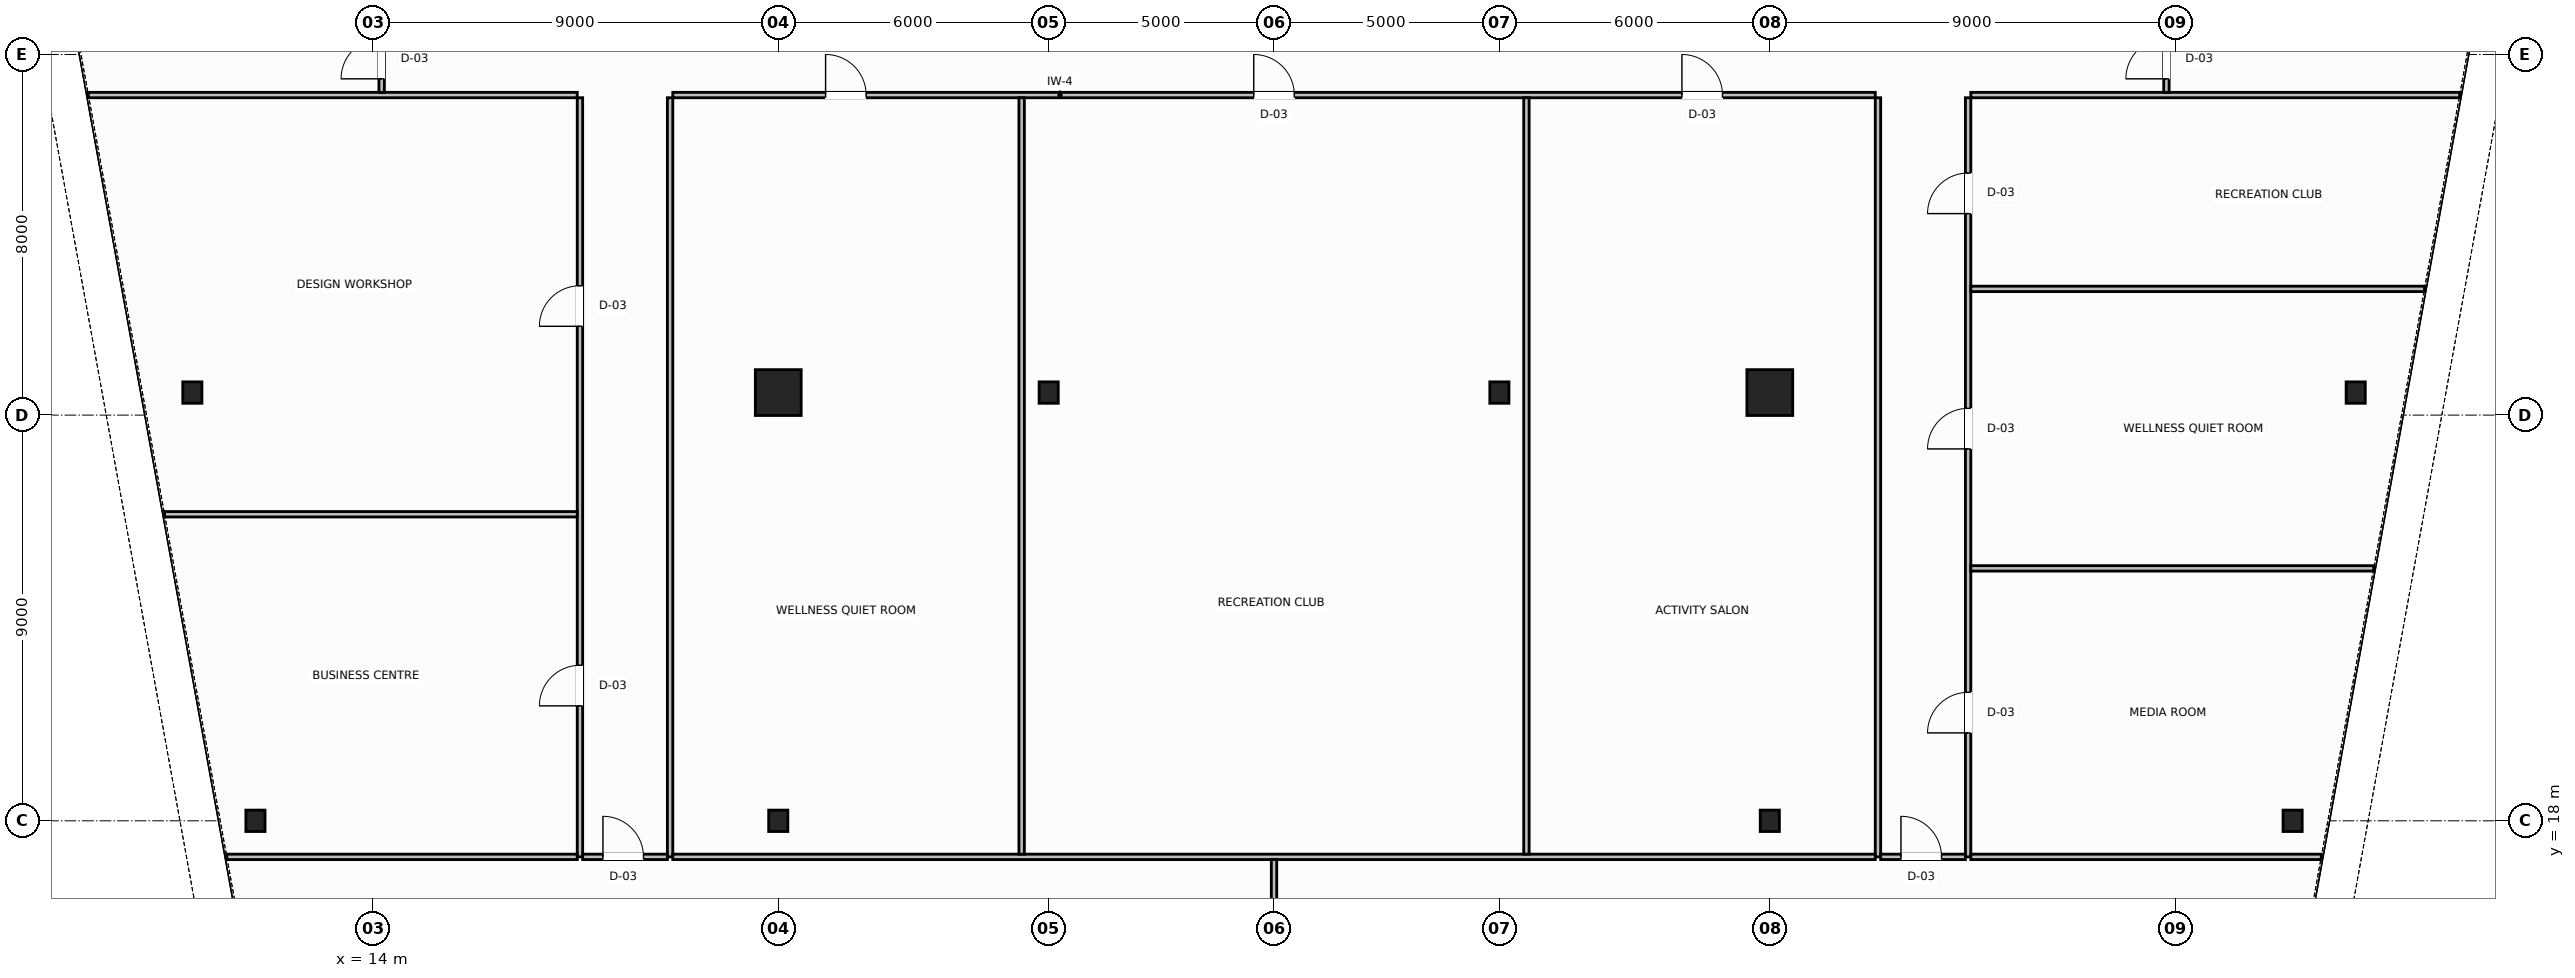
"""IFC4 building model, lengths in metres.
Left out: names, types, materials, properties, quantities, classifications, styles, units other than length and angle.
Written with IfcOpenShell. Run it as: python <this file> out.ifc"""

import sys

from ifc_helpers import new_model, si_unit, direction, frame, frame_2d, origin, origin_2d, place, context, subcontext, project, spatial, rectangle, hollow_circle, i_section, extrude, source, transform, mapped, element, fill, save


model = new_model("IFC4")
c1 = context("Model", 3, precision=1e-05, world=origin(), true_north=direction((0.0, 1.0)))
c2 = subcontext(c1, "Body", "Model", "MODEL_VIEW")
j1 = project(units=[si_unit("LENGTHUNIT", "METRE"), si_unit("PLANEANGLEUNIT", "RADIAN")], contexts=[c1])
p1 = place(None, origin())
s1 = spatial("IfcSite", under=j1, at=p1, CompositionType="ELEMENT")
p2 = place(p1, origin())
s2 = spatial("IfcBuilding", under=s1, at=p2, CompositionType="ELEMENT")
p3 = place(p2, frame((0.0, 0.0, 130.0)))
s3 = spatial("IfcBuildingStorey", under=s2, at=p3, CompositionType="ELEMENT", Elevation=130.0)
m1 = source(origin(), c2, "Body", "SweptSolid", [
    extrude(i_section(OverallWidth=0.424, OverallDepth=0.474, WebThickness=0.047, FlangeThickness=0.065, FilletRadius=0.015, at=origin_2d()), origin(), (0.0, 0.0, 1.0), 3.8),
])
for number, where, z_axis, x_axis in (
    (1, (10.0, 27.5, 0.0), (0.0, 0.0, 1.0), (1.0, 0.0, 0.0)),
    (2, (11.4, 18.0, 0.0), (0.0, 0.0, 1.0), (1.0, 0.0, 0.0)),
    (3, (58.0, 27.5, 0.0), (0.0, 0.0, 1.0), (1.0, 0.0, 0.0)),
    (4, (56.6, 18.0, 0.0), (0.0, 0.0, 1.0), (1.0, 0.0, 0.0)),
):
    element("IfcColumn", number, at=place(p3, frame(where, z_axis=z_axis, x_axis=x_axis)), inside=s3, PredefinedType="COLUMN", context=c2, shape_type="MappedRepresentation", body=[
        mapped(m1, transform((0.0, 0.0, 0.0), scale=1.0)),
    ])
m2 = source(origin(), c2, "Body", "SweptSolid", [
    extrude(hollow_circle(Radius=0.508, WallThickness=0.045, at=origin_2d()), origin(), (0.0, 0.0, 1.0), 3.8),
])
p4 = place(p3, frame((23.0, 27.5, 0.0), z_axis=(0.0, 0.0, 1.0), x_axis=(1.0, 0.0, 0.0)))
e5 = element("IfcColumn", 5, at=p4, inside=s3, PredefinedType="COLUMN", context=c2, shape_type="MappedRepresentation", body=[
    mapped(m2, transform((0.0, 0.0, 0.0), scale=1.0)),
])
m3 = source(origin(), c2, "Body", "SweptSolid", [
    extrude(i_section(OverallWidth=0.424, OverallDepth=0.474, WebThickness=0.047, FlangeThickness=0.065, FilletRadius=0.015, at=origin_2d()), origin(), (0.0, 0.0, 1.0), 3.8),
])
for number, where, z_axis, x_axis in (
    (6, (29.0, 27.5, 0.0), (0.0, 0.0, 1.0), (1.0, 0.0, 0.0)),
    (7, (39.0, 27.5, 0.0), (0.0, 0.0, 1.0), (1.0, 0.0, 0.0)),
):
    element("IfcColumn", number, at=place(p3, frame(where, z_axis=z_axis, x_axis=x_axis)), inside=s3, PredefinedType="COLUMN", context=c2, shape_type="MappedRepresentation", body=[
        mapped(m3, transform((0.0, 0.0, 0.0), scale=1.0)),
    ])
p5 = place(p3, frame((45.0, 27.5, 0.0), z_axis=(0.0, 0.0, 1.0), x_axis=(1.0, 0.0, 0.0)))
e8 = element("IfcColumn", 8, at=p5, inside=s3, PredefinedType="COLUMN", context=c2, shape_type="MappedRepresentation", body=[
    mapped(m2, transform((0.0, 0.0, 0.0), scale=1.0)),
])
for number, where, z_axis, x_axis in (
    (9, (23.0, 18.0, 0.0), (0.0, 0.0, 1.0), (1.0, 0.0, 0.0)),
    (10, (45.0, 18.0, 0.0), (0.0, 0.0, 1.0), (1.0, 0.0, 0.0)),
):
    element("IfcColumn", number, at=place(p3, frame(where, z_axis=z_axis, x_axis=x_axis)), inside=s3, PredefinedType="COLUMN", context=c2, shape_type="MappedRepresentation", body=[
        mapped(m3, transform((0.0, 0.0, 0.0), scale=1.0)),
    ])
p6 = place(p3, frame((20.66, 34.1, 0.0), z_axis=(0.0, 0.0, 1.0), x_axis=(1.0, 0.0, 0.0)))
e11 = element("IfcWall", 11, at=p6, inside=s3, PredefinedType="PARTITIONING", context=c2, shape_type="SweptSolid", body=[
    extrude(rectangle(XDim=26.68, YDim=0.12, at=frame_2d((13.34, 0.0))), origin(), (0.0, 0.0, 1.0), 3.58),
])
p7 = place(p6, frame((3.39, 0.0, 0.0)))
e12 = element("IfcOpeningElement", 12, at=p7, cuts=e11, PredefinedType="OPENING", context=c2, shape_type="SweptSolid", body=[
    extrude(rectangle(XDim=0.9, YDim=2.15, at=frame_2d((0.45, 1.075))), frame((0.0, 0.07, 0.0), z_axis=(0.0, -1.0, 0.0), x_axis=(1.0, 0.0, 0.0)), (0.0, 0.0, 1.0), 0.14),
])
p8 = place(p6, frame((12.89, 0.0, 0.0)))
e13 = element("IfcOpeningElement", 13, at=p8, cuts=e11, PredefinedType="OPENING", context=c2, shape_type="SweptSolid", body=[
    extrude(rectangle(XDim=0.9, YDim=2.15, at=frame_2d((0.45, 1.075))), frame((0.0, 0.07, 0.0), z_axis=(0.0, -1.0, 0.0), x_axis=(1.0, 0.0, 0.0)), (0.0, 0.0, 1.0), 0.14),
])
p9 = place(p6, frame((22.39, 0.0, 0.0)))
e14 = element("IfcOpeningElement", 14, at=p9, cuts=e11, PredefinedType="OPENING", context=c2, shape_type="SweptSolid", body=[
    extrude(rectangle(XDim=0.9, YDim=2.15, at=frame_2d((0.45, 1.075))), frame((0.0, 0.07, 0.0), z_axis=(0.0, -1.0, 0.0), x_axis=(1.0, 0.0, 0.0)), (0.0, 0.0, 1.0), 0.14),
])
for number, where, z_axis, x_axis in (
    (15, (7.693, 34.1, 0.0), (0.0, 0.0, 1.0), (1.0, 0.0, 0.0)),
    (16, (49.46, 34.1, 0.0), (0.0, 0.0, 1.0), (1.0, 0.0, 0.0)),
):
    element("IfcWall", number, at=place(p3, frame(where, z_axis=z_axis, x_axis=x_axis)), inside=s3, PredefinedType="PARTITIONING", context=c2, shape_type="SweptSolid", body=[
        extrude(rectangle(XDim=10.847, YDim=0.12, at=frame_2d((5.424, 0.0))), origin(), (0.0, 0.0, 1.0), 3.58),
    ])
p10 = place(p3, frame((14.2, 34.16, 0.0), z_axis=(0.0, 0.0, 1.0), x_axis=(0.0, 1.0, 0.0)))
e17 = element("IfcWall", 17, at=p10, inside=s3, PredefinedType="PARTITIONING", context=c2, shape_type="SweptSolid", body=[
    extrude(rectangle(XDim=2.28, YDim=0.12, at=frame_2d((1.14, 0.0))), origin(), (0.0, 0.0, 1.0), 3.58),
])
p11 = place(p10, frame((0.3, 0.0, 0.0)))
e18 = element("IfcOpeningElement", 18, at=p11, cuts=e17, PredefinedType="OPENING", context=c2, shape_type="SweptSolid", body=[
    extrude(rectangle(XDim=0.9, YDim=2.15, at=frame_2d((0.45, 1.075))), frame((0.0, 0.07, 0.0), z_axis=(0.0, -1.0, 0.0), x_axis=(1.0, 0.0, 0.0)), (0.0, 0.0, 1.0), 0.14),
])
p12 = place(p3, frame((53.8, 34.16, 0.0), z_axis=(0.0, 0.0, 1.0), x_axis=(0.0, 1.0, 0.0)))
e19 = element("IfcWall", 19, at=p12, inside=s3, PredefinedType="PARTITIONING", context=c2, shape_type="SweptSolid", body=[
    extrude(rectangle(XDim=2.28, YDim=0.12, at=frame_2d((1.14, 0.0))), origin(), (0.0, 0.0, 1.0), 3.58),
])
p13 = place(p12, frame((0.3, 0.0, 0.0)))
e20 = element("IfcOpeningElement", 20, at=p13, cuts=e19, PredefinedType="OPENING", context=c2, shape_type="SweptSolid", body=[
    extrude(rectangle(XDim=0.9, YDim=2.15, at=frame_2d((0.45, 1.075))), frame((0.0, 0.07, 0.0), z_axis=(0.0, -1.0, 0.0), x_axis=(1.0, 0.0, 0.0)), (0.0, 0.0, 1.0), 0.14),
])
p14 = place(p3, frame((18.6, 17.2, 0.0), z_axis=(0.0, 0.0, 1.0), x_axis=(0.0, 1.0, 0.0)))
e21 = element("IfcWall", 21, at=p14, inside=s3, PredefinedType="PARTITIONING", context=c2, shape_type="SweptSolid", body=[
    extrude(rectangle(XDim=16.84, YDim=0.12, at=frame_2d((8.42, 0.0))), origin(), (0.0, 0.0, 1.0), 3.58),
])
p15 = place(p14, frame((3.35, 0.0, 0.0)))
e22 = element("IfcOpeningElement", 22, at=p15, cuts=e21, PredefinedType="OPENING", context=c2, shape_type="SweptSolid", body=[
    extrude(rectangle(XDim=0.9, YDim=2.15, at=frame_2d((0.45, 1.075))), frame((0.0, 0.07, 0.0), z_axis=(0.0, -1.0, 0.0), x_axis=(1.0, 0.0, 0.0)), (0.0, 0.0, 1.0), 0.14),
])
p16 = place(p14, frame((11.77, 0.0, 0.0)))
e23 = element("IfcOpeningElement", 23, at=p16, cuts=e21, PredefinedType="OPENING", context=c2, shape_type="SweptSolid", body=[
    extrude(rectangle(XDim=0.9, YDim=2.15, at=frame_2d((0.45, 1.075))), frame((0.0, 0.07, 0.0), z_axis=(0.0, -1.0, 0.0), x_axis=(1.0, 0.0, 0.0)), (0.0, 0.0, 1.0), 0.14),
])
for number, where, z_axis, x_axis in (
    (24, (20.6, 17.2, 0.0), (0.0, 0.0, 1.0), (0.0, 1.0, 0.0)),
    (25, (47.4, 17.2, 0.0), (0.0, 0.0, 1.0), (0.0, 1.0, 0.0)),
):
    element("IfcWall", number, at=place(p3, frame(where, z_axis=z_axis, x_axis=x_axis)), inside=s3, PredefinedType="PARTITIONING", context=c2, shape_type="SweptSolid", body=[
        extrude(rectangle(XDim=16.84, YDim=0.12, at=frame_2d((8.42, 0.0))), origin(), (0.0, 0.0, 1.0), 3.58),
    ])
p17 = place(p3, frame((49.4, 17.2, 0.0), z_axis=(0.0, 0.0, 1.0), x_axis=(0.0, 1.0, 0.0)))
e26 = element("IfcWall", 26, at=p17, inside=s3, PredefinedType="PARTITIONING", context=c2, shape_type="SweptSolid", body=[
    extrude(rectangle(XDim=16.84, YDim=0.12, at=frame_2d((8.42, 0.0))), origin(), (0.0, 0.0, 1.0), 3.58),
])
p18 = place(p17, frame((2.75, 0.0, 0.0)))
e27 = element("IfcOpeningElement", 27, at=p18, cuts=e26, PredefinedType="OPENING", context=c2, shape_type="SweptSolid", body=[
    extrude(rectangle(XDim=0.9, YDim=2.15, at=frame_2d((0.45, 1.075))), frame((0.0, 0.07, 0.0), z_axis=(0.0, -1.0, 0.0), x_axis=(1.0, 0.0, 0.0)), (0.0, 0.0, 1.0), 0.14),
])
p19 = place(p17, frame((9.05, 0.0, 0.0)))
e28 = element("IfcOpeningElement", 28, at=p19, cuts=e26, PredefinedType="OPENING", context=c2, shape_type="SweptSolid", body=[
    extrude(rectangle(XDim=0.9, YDim=2.15, at=frame_2d((0.45, 1.075))), frame((0.0, 0.07, 0.0), z_axis=(0.0, -1.0, 0.0), x_axis=(1.0, 0.0, 0.0)), (0.0, 0.0, 1.0), 0.14),
])
p20 = place(p17, frame((14.27, 0.0, 0.0)))
e29 = element("IfcOpeningElement", 29, at=p20, cuts=e26, PredefinedType="OPENING", context=c2, shape_type="SweptSolid", body=[
    extrude(rectangle(XDim=0.9, YDim=2.15, at=frame_2d((0.45, 1.075))), frame((0.0, 0.07, 0.0), z_axis=(0.0, -1.0, 0.0), x_axis=(1.0, 0.0, 0.0)), (0.0, 0.0, 1.0), 0.14),
])
p21 = place(p3, frame((18.66, 17.2, 0.0), z_axis=(0.0, 0.0, 1.0), x_axis=(1.0, 0.0, 0.0)))
e30 = element("IfcWall", 30, at=p21, inside=s3, PredefinedType="PARTITIONING", context=c2, shape_type="SweptSolid", body=[
    extrude(rectangle(XDim=1.88, YDim=0.12, at=frame_2d((0.94, 0.0))), origin(), (0.0, 0.0, 1.0), 3.58),
])
p22 = place(p21, frame((0.45, 0.0, 0.0)))
e31 = element("IfcOpeningElement", 31, at=p22, cuts=e30, PredefinedType="OPENING", context=c2, shape_type="SweptSolid", body=[
    extrude(rectangle(XDim=0.9, YDim=2.15, at=frame_2d((0.45, 1.075))), frame((0.0, 0.07, 0.0), z_axis=(0.0, -1.0, 0.0), x_axis=(1.0, 0.0, 0.0)), (0.0, 0.0, 1.0), 0.14),
])
p23 = place(p3, frame((47.46, 17.2, 0.0), z_axis=(0.0, 0.0, 1.0), x_axis=(1.0, 0.0, 0.0)))
e32 = element("IfcWall", 32, at=p23, inside=s3, PredefinedType="PARTITIONING", context=c2, shape_type="SweptSolid", body=[
    extrude(rectangle(XDim=1.88, YDim=0.12, at=frame_2d((0.94, 0.0))), origin(), (0.0, 0.0, 1.0), 3.58),
])
p24 = place(p23, frame((0.45, 0.0, 0.0)))
e33 = element("IfcOpeningElement", 33, at=p24, cuts=e32, PredefinedType="OPENING", context=c2, shape_type="SweptSolid", body=[
    extrude(rectangle(XDim=0.9, YDim=2.15, at=frame_2d((0.45, 1.075))), frame((0.0, 0.07, 0.0), z_axis=(0.0, -1.0, 0.0), x_axis=(1.0, 0.0, 0.0)), (0.0, 0.0, 1.0), 0.14),
])
p25 = place(p3, frame((10.764, 17.2, 0.0), z_axis=(0.0, 0.0, 1.0), x_axis=(1.0, 0.0, 0.0)))
e34 = element("IfcWall", 34, at=p25, inside=s3, PredefinedType="PARTITIONING", context=c2, shape_type="SweptSolid", body=[
    extrude(rectangle(XDim=7.776, YDim=0.12, at=frame_2d((3.888, 0.0))), origin(), (0.0, 0.0, 1.0), 3.58),
])
p26 = place(p3, frame((9.383, 24.8, 0.0), z_axis=(0.0, 0.0, 1.0), x_axis=(1.0, 0.0, 0.0)))
e35 = element("IfcWall", 35, at=p26, inside=s3, PredefinedType="PARTITIONING", context=c2, shape_type="SweptSolid", body=[
    extrude(rectangle(XDim=9.157, YDim=0.12, at=frame_2d((4.579, 0.0))), origin(), (0.0, 0.0, 1.0), 3.58),
])
p27 = place(p3, frame((49.46, 17.2, 0.0), z_axis=(0.0, 0.0, 1.0), x_axis=(1.0, 0.0, 0.0)))
e36 = element("IfcWall", 36, at=p27, inside=s3, PredefinedType="PARTITIONING", context=c2, shape_type="SweptSolid", body=[
    extrude(rectangle(XDim=7.776, YDim=0.12, at=frame_2d((3.888, 0.0))), origin(), (0.0, 0.0, 1.0), 3.58),
])
p28 = place(p3, frame((49.46, 23.6, 0.0), z_axis=(0.0, 0.0, 1.0), x_axis=(1.0, 0.0, 0.0)))
e37 = element("IfcWall", 37, at=p28, inside=s3, PredefinedType="PARTITIONING", context=c2, shape_type="SweptSolid", body=[
    extrude(rectangle(XDim=8.939, YDim=0.12, at=frame_2d((4.47, 0.0))), origin(), (0.0, 0.0, 1.0), 3.58),
])
p29 = place(p3, frame((49.46, 29.8, 0.0), z_axis=(0.0, 0.0, 1.0), x_axis=(1.0, 0.0, 0.0)))
e38 = element("IfcWall", 38, at=p29, inside=s3, PredefinedType="PARTITIONING", context=c2, shape_type="SweptSolid", body=[
    extrude(rectangle(XDim=10.066, YDim=0.12, at=frame_2d((5.033, 0.0))), origin(), (0.0, 0.0, 1.0), 3.58),
])
p30 = place(p3, frame((20.66, 17.2, 0.0), z_axis=(0.0, 0.0, 1.0), x_axis=(1.0, 0.0, 0.0)))
e39 = element("IfcWall", 39, at=p30, inside=s3, PredefinedType="PARTITIONING", context=c2, shape_type="SweptSolid", body=[
    extrude(rectangle(XDim=26.68, YDim=0.12, at=frame_2d((13.34, 0.0))), origin(), (0.0, 0.0, 1.0), 3.58),
])
for number, where, z_axis, x_axis in (
    (40, (28.4, 17.26, 0.0), (0.0, 0.0, 1.0), (0.0, 1.0, 0.0)),
    (41, (39.6, 17.26, 0.0), (0.0, 0.0, 1.0), (0.0, 1.0, 0.0)),
):
    element("IfcWall", number, at=place(p3, frame(where, z_axis=z_axis, x_axis=x_axis)), inside=s3, PredefinedType="PARTITIONING", context=c2, shape_type="SweptSolid", body=[
        extrude(rectangle(XDim=16.78, YDim=0.12, at=frame_2d((8.39, 0.0))), origin(), (0.0, 0.0, 1.0), 3.58),
    ])
p31 = place(p3, frame((34.0, 5.796, 0.0), z_axis=(0.0, 0.0, 1.0), x_axis=(0.0, 1.0, 0.0)))
e42 = element("IfcWall", 42, at=p31, inside=s3, PredefinedType="PARTITIONING", context=c2, shape_type="SweptSolid", body=[
    extrude(rectangle(XDim=11.344, YDim=0.12, at=frame_2d((5.672, 0.0))), origin(), (0.0, 0.0, 1.0), 3.58),
])
p32 = place(p31, frame((5.222, 0.0, 0.0)))
e43 = element("IfcOpeningElement", 43, at=p32, cuts=e42, PredefinedType="OPENING", context=c2, shape_type="SweptSolid", body=[
    extrude(rectangle(XDim=0.9, YDim=2.15, at=frame_2d((0.45, 1.075))), frame((0.0, 0.07, 0.0), z_axis=(0.0, -1.0, 0.0), x_axis=(1.0, 0.0, 0.0)), (0.0, 0.0, 1.0), 0.14),
])
m4 = source(origin(), c2, "Body", "SweptSolid", [
    extrude(rectangle(XDim=0.9, YDim=2.15, at=frame_2d((0.45, 1.075))), frame((0.0, 0.025, 0.0), z_axis=(0.0, -1.0, 0.0), x_axis=(1.0, 0.0, 0.0)), (0.0, 0.0, 1.0), 0.05),
])
p33 = place(p11, origin())
e44 = element("IfcDoor", 44, at=p33, inside=s3, OperationType="SINGLE_SWING_LEFT", PredefinedType="DOOR", context=c2, shape_type="MappedRepresentation", body=[
    mapped(m4, transform((0.0, 0.0, 0.0), scale=1.0)),
])
fill(e18, e44)
p34 = place(p13, origin())
e45 = element("IfcDoor", 45, at=p34, inside=s3, OperationType="SINGLE_SWING_RIGHT", PredefinedType="DOOR", context=c2, shape_type="MappedRepresentation", body=[
    mapped(m4, transform((0.0, 0.0, 0.0), scale=1.0)),
])
fill(e20, e45)
p35 = place(p15, origin())
e46 = element("IfcDoor", 46, at=p35, inside=s3, OperationType="SINGLE_SWING_LEFT", PredefinedType="DOOR", context=c2, shape_type="MappedRepresentation", body=[
    mapped(m4, transform((0.0, 0.0, 0.0), scale=1.0)),
])
fill(e22, e46)
p36 = place(p16, origin())
e47 = element("IfcDoor", 47, at=p36, inside=s3, OperationType="SINGLE_SWING_RIGHT", PredefinedType="DOOR", context=c2, shape_type="MappedRepresentation", body=[
    mapped(m4, transform((0.0, 0.0, 0.0), scale=1.0)),
])
fill(e23, e47)
p37 = place(p18, origin())
e48 = element("IfcDoor", 48, at=p37, inside=s3, OperationType="SINGLE_SWING_RIGHT", PredefinedType="DOOR", context=c2, shape_type="MappedRepresentation", body=[
    mapped(m4, transform((0.0, 0.0, 0.0), scale=1.0)),
])
fill(e27, e48)
p38 = place(p19, origin())
e49 = element("IfcDoor", 49, at=p38, inside=s3, OperationType="SINGLE_SWING_LEFT", PredefinedType="DOOR", context=c2, shape_type="MappedRepresentation", body=[
    mapped(m4, transform((0.0, 0.0, 0.0), scale=1.0)),
])
fill(e28, e49)
p39 = place(p20, origin())
e50 = element("IfcDoor", 50, at=p39, inside=s3, OperationType="SINGLE_SWING_RIGHT", PredefinedType="DOOR", context=c2, shape_type="MappedRepresentation", body=[
    mapped(m4, transform((0.0, 0.0, 0.0), scale=1.0)),
])
fill(e29, e50)
p40 = place(p7, origin())
e51 = element("IfcDoor", 51, at=p40, inside=s3, OperationType="SINGLE_SWING_LEFT", PredefinedType="DOOR", context=c2, shape_type="MappedRepresentation", body=[
    mapped(m4, transform((0.0, 0.0, 0.0), scale=1.0)),
])
fill(e12, e51)
p41 = place(p8, origin())
e52 = element("IfcDoor", 52, at=p41, inside=s3, OperationType="SINGLE_SWING_RIGHT", PredefinedType="DOOR", context=c2, shape_type="MappedRepresentation", body=[
    mapped(m4, transform((0.0, 0.0, 0.0), scale=1.0)),
])
fill(e13, e52)
p42 = place(p9, origin())
e53 = element("IfcDoor", 53, at=p42, inside=s3, OperationType="SINGLE_SWING_LEFT", PredefinedType="DOOR", context=c2, shape_type="MappedRepresentation", body=[
    mapped(m4, transform((0.0, 0.0, 0.0), scale=1.0)),
])
fill(e14, e53)
p43 = place(p22, origin())
e54 = element("IfcDoor", 54, at=p43, inside=s3, OperationType="SINGLE_SWING_LEFT", PredefinedType="DOOR", context=c2, shape_type="MappedRepresentation", body=[
    mapped(m4, transform((0.0, 0.0, 0.0), scale=1.0)),
])
fill(e31, e54)
p44 = place(p24, origin())
e55 = element("IfcDoor", 55, at=p44, inside=s3, OperationType="SINGLE_SWING_RIGHT", PredefinedType="DOOR", context=c2, shape_type="MappedRepresentation", body=[
    mapped(m4, transform((0.0, 0.0, 0.0), scale=1.0)),
])
fill(e33, e55)
save(model, sys.argv[1])
